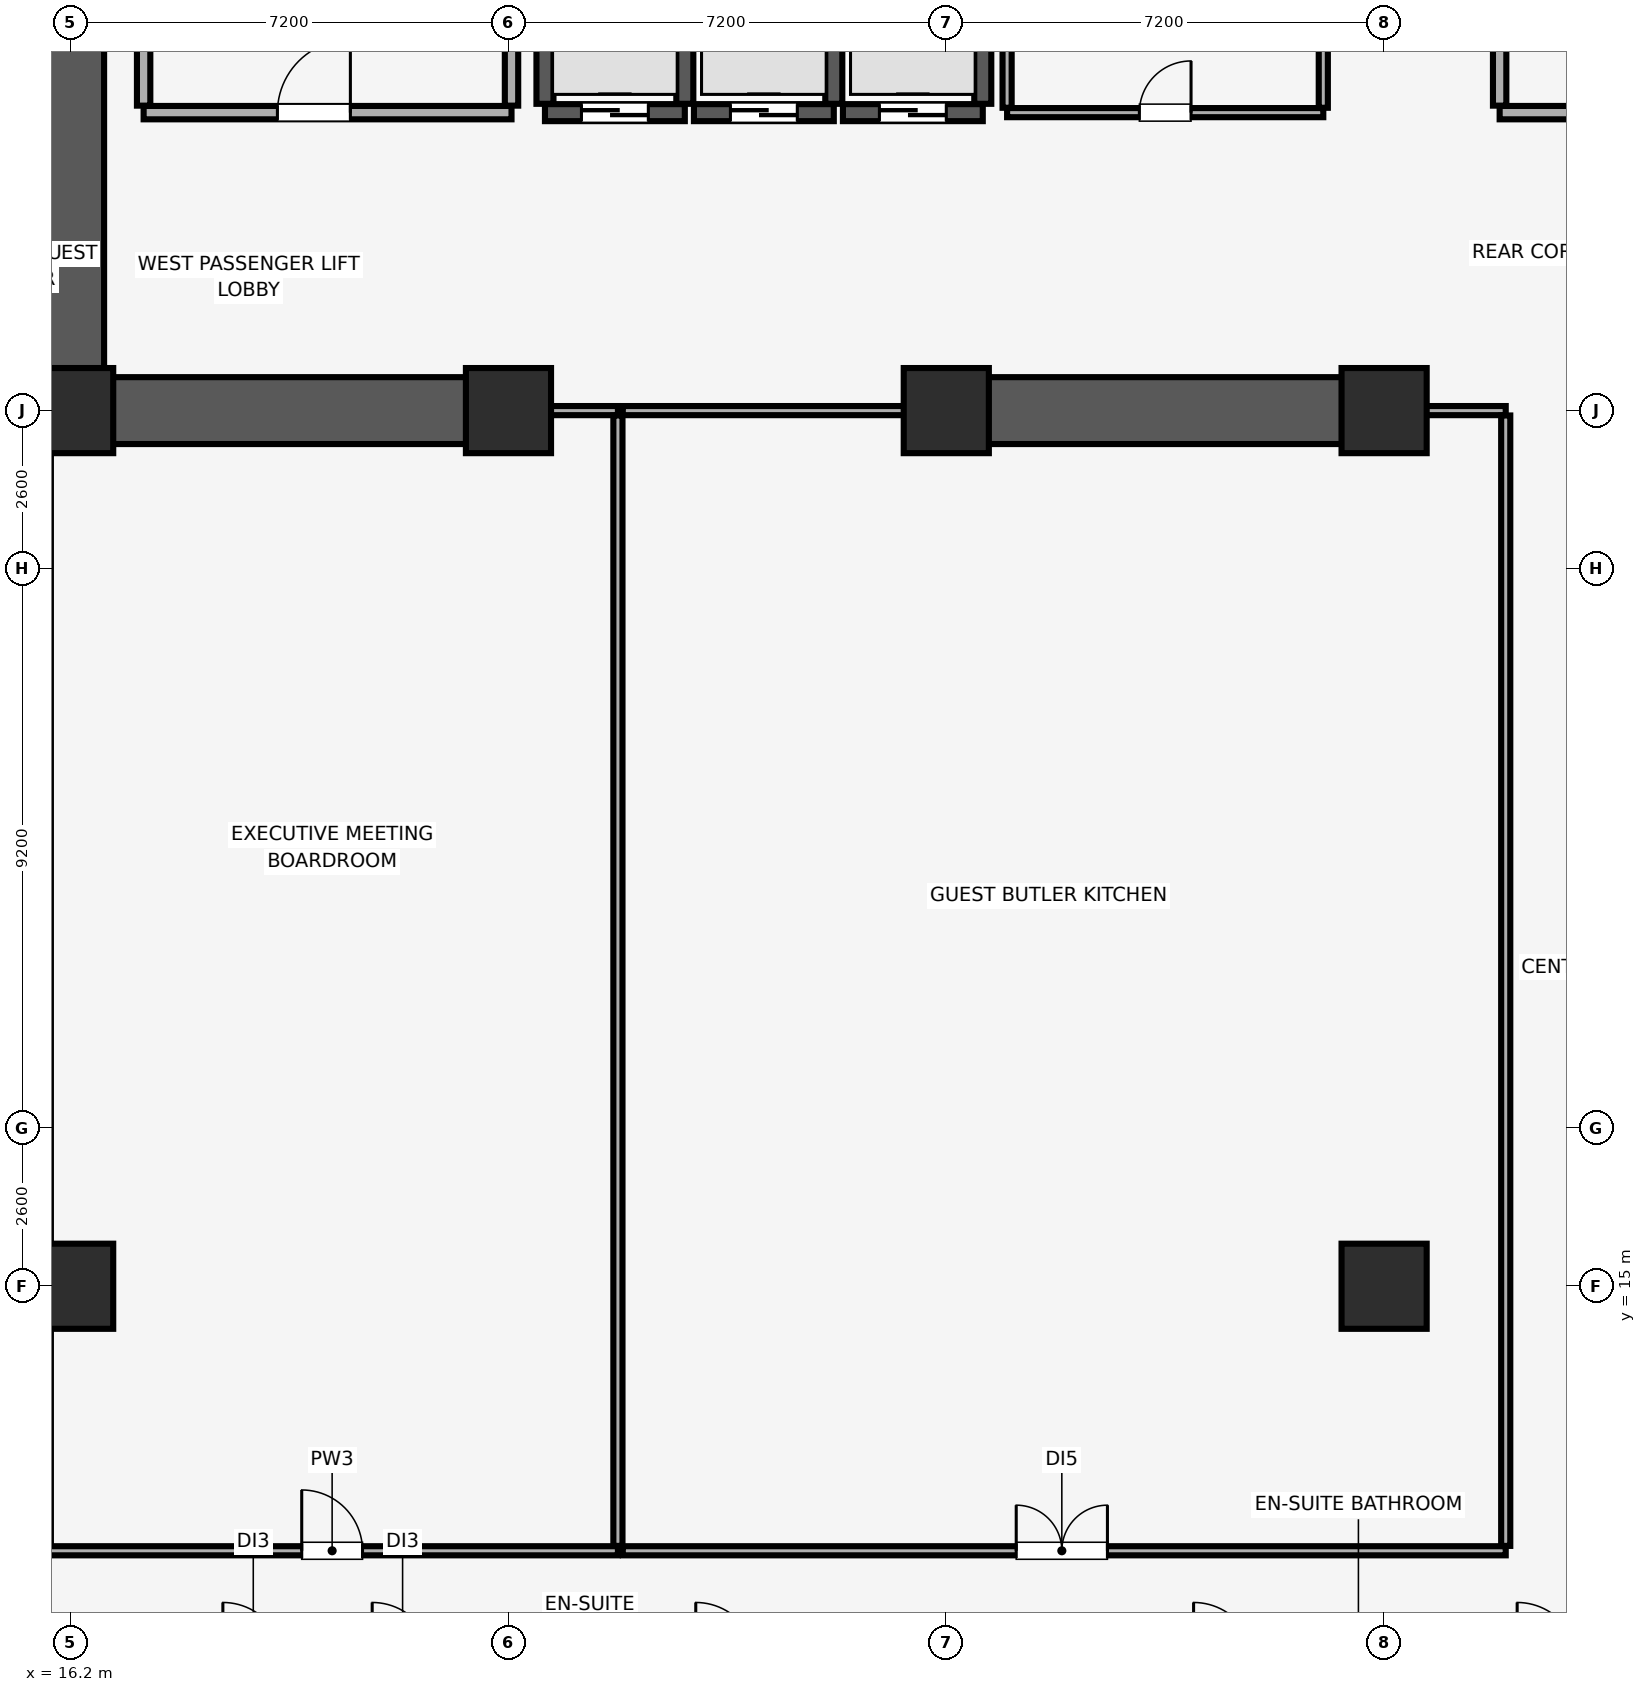
"""IFC4 building model, lengths in metres.
Left out: names, types, materials, properties, quantities, classifications, styles, units other than length and angle.
Written with IfcOpenShell. Run it as: python <this file> out.ifc"""

import sys

from ifc_helpers import new_model, si_unit, direction, frame, frame_2d, origin, origin_2d, place, context, subcontext, project, spatial, rectangle, extrude, element, fill, save


model = new_model("IFC4")
c1 = context("Model", 3, precision=1e-05, world=origin(), true_north=direction((0.0, 1.0)))
c2 = subcontext(c1, "Body", "Model", "MODEL_VIEW")
j1 = project(units=[si_unit("LENGTHUNIT", "METRE"), si_unit("PLANEANGLEUNIT", "RADIAN")], contexts=[c1])
p1 = place(None, origin())
s1 = spatial("IfcSite", under=j1, at=p1, CompositionType="ELEMENT")
p2 = place(p1, origin())
s2 = spatial("IfcBuilding", under=s1, at=p2, CompositionType="ELEMENT")
p3 = place(p2, frame((0.0, 0.0, 31.4)))
s3 = spatial("IfcBuildingStorey", under=s2, at=p3, CompositionType="ELEMENT", Elevation=31.4)
for number, where, z_axis, x_axis in (
    (1, (16.2, 15.0, 0.0), (0.0, 0.0, 1.0), (1.0, 0.0, 0.0)),
    (2, (37.8, 15.0, 0.0), (0.0, 0.0, 1.0), (1.0, 0.0, 0.0)),
    (3, (16.2, 29.4, 0.0), (0.0, 0.0, 1.0), (1.0, 0.0, 0.0)),
    (4, (23.4, 29.4, 0.0), (0.0, 0.0, 1.0), (1.0, 0.0, 0.0)),
    (5, (30.6, 29.4, 0.0), (0.0, 0.0, 1.0), (1.0, 0.0, 0.0)),
    (6, (37.8, 29.4, 0.0), (0.0, 0.0, 1.0), (1.0, 0.0, 0.0)),
):
    element("IfcColumn", number, at=place(p3, frame(where, z_axis=z_axis, x_axis=x_axis)), inside=s3, PredefinedType="COLUMN", context=c2, shape_type="SweptSolid", body=[
        extrude(rectangle(XDim=1.4, YDim=1.4, at=origin_2d()), origin(), (0.0, 0.0, 1.0), 3.51),
    ])
p4 = place(p3, frame((16.2, 29.4, 0.0), z_axis=(0.0, 0.0, 1.0), x_axis=(0.0, 1.0, 0.0)))
e7 = element("IfcWall", 7, at=p4, inside=s3, PredefinedType="SHEAR", context=c2, shape_type="SweptSolid", body=[
    extrude(rectangle(XDim=19.2, YDim=1.1, at=frame_2d((9.6, 0.0))), origin(), (0.0, 0.0, 1.0), 3.51),
])
p5 = place(p3, frame((16.755, 29.4, 0.0), z_axis=(0.0, 0.0, 1.0), x_axis=(1.0, 0.0, 0.0)))
e8 = element("IfcWall", 8, at=p5, inside=s3, PredefinedType="SHEAR", context=c2, shape_type="SweptSolid", body=[
    extrude(rectangle(XDim=6.845, YDim=1.1, at=frame_2d((3.423, 0.0))), origin(), (0.0, 0.0, 1.0), 3.51),
])
p6 = place(p3, frame((30.4, 29.4, 0.0), z_axis=(0.0, 0.0, 1.0), x_axis=(1.0, 0.0, 0.0)))
e9 = element("IfcWall", 9, at=p6, inside=s3, PredefinedType="SHEAR", context=c2, shape_type="SweptSolid", body=[
    extrude(rectangle(XDim=7.6, YDim=1.1, at=frame_2d((3.8, 0.0))), origin(), (0.0, 0.0, 1.0), 3.51),
])
p7 = place(p3, frame((24.0, 34.3, 0.0), z_axis=(0.0, 0.0, 1.0), x_axis=(1.0, 0.0, 0.0)))
e10 = element("IfcWall", 10, at=p7, inside=s3, PredefinedType="SHEAR", context=c2, shape_type="SweptSolid", body=[
    extrude(rectangle(XDim=2.3, YDim=0.28, at=frame_2d((1.15, 0.0))), origin(), (0.0, 0.0, 1.0), 3.51),
])
p8 = place(p7, frame((0.6, 0.0, 0.0)))
e11 = element("IfcOpeningElement", 11, at=p8, cuts=e10, PredefinedType="OPENING", context=c2, shape_type="SweptSolid", body=[
    extrude(rectangle(XDim=1.1, YDim=2.2, at=frame_2d((0.55, 1.1))), frame((0.0, 0.15, 0.0), z_axis=(0.0, -1.0, 0.0), x_axis=(1.0, 0.0, 0.0)), (0.0, 0.0, 1.0), 0.3),
])
for number, where, z_axis, x_axis in (
    (12, (24.0, 34.445, 0.0), (0.0, 0.0, 1.0), (0.0, 1.0, 0.0)),
    (13, (26.3, 34.445, 0.0), (0.0, 0.0, 1.0), (0.0, 1.0, 0.0)),
):
    element("IfcWall", number, at=place(p3, frame(where, z_axis=z_axis, x_axis=x_axis)), inside=s3, PredefinedType="SHEAR", context=c2, shape_type="SweptSolid", body=[
        extrude(rectangle(XDim=2.01, YDim=0.28, at=frame_2d((1.005, 0.0))), origin(), (0.0, 0.0, 1.0), 3.51),
    ])
p9 = place(p3, frame((26.45, 34.3, 0.0), z_axis=(0.0, 0.0, 1.0), x_axis=(1.0, 0.0, 0.0)))
e14 = element("IfcWall", 14, at=p9, inside=s3, PredefinedType="SHEAR", context=c2, shape_type="SweptSolid", body=[
    extrude(rectangle(XDim=2.3, YDim=0.28, at=frame_2d((1.15, 0.0))), origin(), (0.0, 0.0, 1.0), 3.51),
])
p10 = place(p9, frame((0.6, 0.0, 0.0)))
e15 = element("IfcOpeningElement", 15, at=p10, cuts=e14, PredefinedType="OPENING", context=c2, shape_type="SweptSolid", body=[
    extrude(rectangle(XDim=1.1, YDim=2.2, at=frame_2d((0.55, 1.1))), frame((0.0, 0.15, 0.0), z_axis=(0.0, -1.0, 0.0), x_axis=(1.0, 0.0, 0.0)), (0.0, 0.0, 1.0), 0.3),
])
p11 = place(p3, frame((28.75, 34.445, 0.0), z_axis=(0.0, 0.0, 1.0), x_axis=(0.0, 1.0, 0.0)))
e16 = element("IfcWall", 16, at=p11, inside=s3, PredefinedType="SHEAR", context=c2, shape_type="SweptSolid", body=[
    extrude(rectangle(XDim=2.01, YDim=0.28, at=frame_2d((1.005, 0.0))), origin(), (0.0, 0.0, 1.0), 3.51),
])
p12 = place(p3, frame((28.9, 34.3, 0.0), z_axis=(0.0, 0.0, 1.0), x_axis=(1.0, 0.0, 0.0)))
e17 = element("IfcWall", 17, at=p12, inside=s3, PredefinedType="SHEAR", context=c2, shape_type="SweptSolid", body=[
    extrude(rectangle(XDim=2.3, YDim=0.28, at=frame_2d((1.15, 0.0))), origin(), (0.0, 0.0, 1.0), 3.51),
])
p13 = place(p12, frame((0.6, 0.0, 0.0)))
e18 = element("IfcOpeningElement", 18, at=p13, cuts=e17, PredefinedType="OPENING", context=c2, shape_type="SweptSolid", body=[
    extrude(rectangle(XDim=1.1, YDim=2.2, at=frame_2d((0.55, 1.1))), frame((0.0, 0.15, 0.0), z_axis=(0.0, -1.0, 0.0), x_axis=(1.0, 0.0, 0.0)), (0.0, 0.0, 1.0), 0.3),
])
p14 = place(p3, frame((31.2, 34.445, 0.0), z_axis=(0.0, 0.0, 1.0), x_axis=(0.0, 1.0, 0.0)))
e19 = element("IfcWall", 19, at=p14, inside=s3, PredefinedType="SHEAR", context=c2, shape_type="SweptSolid", body=[
    extrude(rectangle(XDim=2.01, YDim=0.28, at=frame_2d((1.005, 0.0))), origin(), (0.0, 0.0, 1.0), 3.51),
])
p15 = place(p3, frame((17.4, 34.3, 0.0), z_axis=(0.0, 0.0, 1.0), x_axis=(1.0, 0.0, 0.0)))
e20 = element("IfcWall", 20, at=p15, inside=s3, PredefinedType="PARTITIONING", context=c2, shape_type="SweptSolid", body=[
    extrude(rectangle(XDim=6.05, YDim=0.22, at=frame_2d((3.025, 0.0))), origin(), (0.0, 0.0, 1.0), 3.51),
])
p16 = place(p15, frame((2.2, 0.0, 0.0)))
e21 = element("IfcOpeningElement", 21, at=p16, cuts=e20, PredefinedType="OPENING", context=c2, shape_type="SweptSolid", body=[
    extrude(rectangle(XDim=1.2, YDim=2.15, at=frame_2d((0.6, 1.075))), frame((0.0, 0.12, 0.0), z_axis=(0.0, -1.0, 0.0), x_axis=(1.0, 0.0, 0.0)), (0.0, 0.0, 1.0), 0.24),
])
p17 = place(p3, frame((17.4, 34.415, 0.0), z_axis=(0.0, 0.0, 1.0), x_axis=(0.0, 1.0, 0.0)))
e22 = element("IfcWall", 22, at=p17, inside=s3, PredefinedType="PARTITIONING", context=c2, shape_type="SweptSolid", body=[
    extrude(rectangle(XDim=5.43, YDim=0.22, at=frame_2d((2.715, 0.0))), origin(), (0.0, 0.0, 1.0), 3.51),
])
p18 = place(p3, frame((23.45, 34.415, 0.0), z_axis=(0.0, 0.0, 1.0), x_axis=(0.0, 1.0, 0.0)))
e23 = element("IfcWall", 23, at=p18, inside=s3, PredefinedType="PARTITIONING", context=c2, shape_type="SweptSolid", body=[
    extrude(rectangle(XDim=5.64, YDim=0.22, at=frame_2d((2.82, 0.0))), origin(), (0.0, 0.0, 1.0), 3.51),
])
p19 = place(p3, frame((39.7, 34.3, 0.0), z_axis=(0.0, 0.0, 1.0), x_axis=(1.0, 0.0, 0.0)))
e24 = element("IfcWall", 24, at=p19, inside=s3, PredefinedType="PARTITIONING", context=c2, shape_type="SweptSolid", body=[
    extrude(rectangle(XDim=4.6, YDim=0.22, at=frame_2d((2.3, 0.0))), origin(), (0.0, 0.0, 1.0), 3.51),
])
p20 = place(p19, frame((1.7, 0.0, 0.0)))
e25 = element("IfcOpeningElement", 25, at=p20, cuts=e24, PredefinedType="OPENING", context=c2, shape_type="SweptSolid", body=[
    extrude(rectangle(XDim=1.2, YDim=2.15, at=frame_2d((0.6, 1.075))), frame((0.0, 0.12, 0.0), z_axis=(0.0, -1.0, 0.0), x_axis=(1.0, 0.0, 0.0)), (0.0, 0.0, 1.0), 0.24),
])
p21 = place(p3, frame((39.7, 34.415, 0.0), z_axis=(0.0, 0.0, 1.0), x_axis=(0.0, 1.0, 0.0)))
e26 = element("IfcWall", 26, at=p21, inside=s3, PredefinedType="PARTITIONING", context=c2, shape_type="SweptSolid", body=[
    extrude(rectangle(XDim=5.785, YDim=0.22, at=frame_2d((2.893, 0.0))), origin(), (0.0, 0.0, 1.0), 3.51),
])
p22 = place(p3, frame((31.6, 34.3, 0.0), z_axis=(0.0, 0.0, 1.0), x_axis=(1.0, 0.0, 0.0)))
e27 = element("IfcWall", 27, at=p22, inside=s3, PredefinedType="PARTITIONING", context=c2, shape_type="SweptSolid", body=[
    extrude(rectangle(XDim=5.2, YDim=0.15, at=frame_2d((2.6, 0.0))), origin(), (0.0, 0.0, 1.0), 3.51),
])
p23 = place(p22, frame((2.175, 0.0, 0.0)))
e28 = element("IfcOpeningElement", 28, at=p23, cuts=e27, PredefinedType="OPENING", context=c2, shape_type="SweptSolid", body=[
    extrude(rectangle(XDim=0.85, YDim=2.1, at=frame_2d((0.425, 1.05))), frame((0.0, 0.085, 0.0), z_axis=(0.0, -1.0, 0.0), x_axis=(1.0, 0.0, 0.0)), (0.0, 0.0, 1.0), 0.17),
])
for number, where, z_axis, x_axis in (
    (29, (31.6, 34.38, 0.0), (0.0, 0.0, 1.0), (0.0, 1.0, 0.0)),
    (30, (36.8, 34.38, 0.0), (0.0, 0.0, 1.0), (0.0, 1.0, 0.0)),
):
    element("IfcWall", number, at=place(p3, frame(where, z_axis=z_axis, x_axis=x_axis)), inside=s3, PredefinedType="PARTITIONING", context=c2, shape_type="SweptSolid", body=[
        extrude(rectangle(XDim=4.94, YDim=0.15, at=frame_2d((2.47, 0.0))), origin(), (0.0, 0.0, 1.0), 3.51),
    ])
p24 = place(p3, frame((15.8, 10.65, 0.0), z_axis=(0.0, 0.0, 1.0), x_axis=(1.0, 0.0, 0.0)))
e31 = element("IfcWall", 31, at=p24, inside=s3, PredefinedType="PARTITIONING", context=c2, shape_type="SweptSolid", body=[
    extrude(rectangle(XDim=9.4, YDim=0.15, at=frame_2d((4.7, 0.0))), origin(), (0.0, 0.0, 1.0), 3.51),
])
p25 = place(p24, frame((4.2, 0.0, 0.0)))
e32 = element("IfcOpeningElement", 32, at=p25, cuts=e31, PredefinedType="OPENING", context=c2, shape_type="SweptSolid", body=[
    extrude(rectangle(XDim=1.0, YDim=2.15, at=frame_2d((0.5, 1.075))), frame((0.0, 0.085, 0.0), z_axis=(0.0, -1.0, 0.0), x_axis=(1.0, 0.0, 0.0)), (0.0, 0.0, 1.0), 0.17),
])
p26 = place(p3, frame((23.61, 29.4, 0.0), z_axis=(0.0, 0.0, 1.0), x_axis=(1.0, 0.0, 0.0)))
e33 = element("IfcWall", 33, at=p26, inside=s3, PredefinedType="PARTITIONING", context=c2, shape_type="SweptSolid", body=[
    extrude(rectangle(XDim=1.59, YDim=0.15, at=frame_2d((0.795, 0.0))), origin(), (0.0, 0.0, 1.0), 2.41),
])
p27 = place(p3, frame((25.2, 10.73, 0.0), z_axis=(0.0, 0.0, 1.0), x_axis=(0.0, 1.0, 0.0)))
e34 = element("IfcWall", 34, at=p27, inside=s3, PredefinedType="PARTITIONING", context=c2, shape_type="SweptSolid", body=[
    extrude(rectangle(XDim=18.59, YDim=0.15, at=frame_2d((9.295, 0.0))), origin(), (0.0, 0.0, 1.0), 3.51),
])
p28 = place(p3, frame((25.28, 10.65, 0.0), z_axis=(0.0, 0.0, 1.0), x_axis=(1.0, 0.0, 0.0)))
e35 = element("IfcWall", 35, at=p28, inside=s3, PredefinedType="PARTITIONING", context=c2, shape_type="SweptSolid", body=[
    extrude(rectangle(XDim=14.52, YDim=0.15, at=frame_2d((7.26, 0.0))), origin(), (0.0, 0.0, 1.0), 3.51),
])
p29 = place(p28, frame((6.47, 0.0, 0.0)))
e36 = element("IfcOpeningElement", 36, at=p29, cuts=e35, PredefinedType="OPENING", context=c2, shape_type="SweptSolid", body=[
    extrude(rectangle(XDim=1.5, YDim=2.25, at=frame_2d((0.75, 1.125))), frame((0.0, 0.085, 0.0), z_axis=(0.0, -1.0, 0.0), x_axis=(1.0, 0.0, 0.0)), (0.0, 0.0, 1.0), 0.17),
])
p30 = place(p3, frame((25.28, 29.4, 0.0), z_axis=(0.0, 0.0, 1.0), x_axis=(1.0, 0.0, 0.0)))
e37 = element("IfcWall", 37, at=p30, inside=s3, PredefinedType="PARTITIONING", context=c2, shape_type="SweptSolid", body=[
    extrude(rectangle(XDim=5.11, YDim=0.15, at=frame_2d((2.555, 0.0))), origin(), (0.0, 0.0, 1.0), 2.41),
])
p31 = place(p3, frame((38.01, 29.4, 0.0), z_axis=(0.0, 0.0, 1.0), x_axis=(1.0, 0.0, 0.0)))
e38 = element("IfcWall", 38, at=p31, inside=s3, PredefinedType="PARTITIONING", context=c2, shape_type="SweptSolid", body=[
    extrude(rectangle(XDim=1.79, YDim=0.15, at=frame_2d((0.895, 0.0))), origin(), (0.0, 0.0, 1.0), 2.41),
])
p32 = place(p3, frame((39.8, 10.73, 0.0), z_axis=(0.0, 0.0, 1.0), x_axis=(0.0, 1.0, 0.0)))
e39 = element("IfcWall", 39, at=p32, inside=s3, PredefinedType="PARTITIONING", context=c2, shape_type="SweptSolid", body=[
    extrude(rectangle(XDim=18.59, YDim=0.15, at=frame_2d((9.295, 0.0))), origin(), (0.0, 0.0, 1.0), 3.51),
])
p33 = place(p8, origin())
e40 = element("IfcDoor", 40, at=p33, inside=s3, OperationType="DOUBLE_DOOR_SLIDING", PredefinedType="DOOR", context=c2, shape_type="SweptSolid", body=[
    extrude(rectangle(XDim=1.1, YDim=2.2, at=frame_2d((0.55, 1.1))), frame((0.0, 0.025, 0.0), z_axis=(0.0, -1.0, 0.0), x_axis=(1.0, 0.0, 0.0)), (0.0, 0.0, 1.0), 0.05),
])
fill(e11, e40)
p34 = place(p10, origin())
e41 = element("IfcDoor", 41, at=p34, inside=s3, OperationType="DOUBLE_DOOR_SLIDING", PredefinedType="DOOR", context=c2, shape_type="SweptSolid", body=[
    extrude(rectangle(XDim=1.1, YDim=2.2, at=frame_2d((0.55, 1.1))), frame((0.0, 0.025, 0.0), z_axis=(0.0, -1.0, 0.0), x_axis=(1.0, 0.0, 0.0)), (0.0, 0.0, 1.0), 0.05),
])
fill(e15, e41)
p35 = place(p13, origin())
e42 = element("IfcDoor", 42, at=p35, inside=s3, OperationType="DOUBLE_DOOR_SLIDING", PredefinedType="DOOR", context=c2, shape_type="SweptSolid", body=[
    extrude(rectangle(XDim=1.1, YDim=2.2, at=frame_2d((0.55, 1.1))), frame((0.0, 0.025, 0.0), z_axis=(0.0, -1.0, 0.0), x_axis=(1.0, 0.0, 0.0)), (0.0, 0.0, 1.0), 0.05),
])
fill(e18, e42)
p36 = place(p16, origin())
e43 = element("IfcDoor", 43, at=p36, inside=s3, OperationType="SINGLE_SWING_RIGHT", PredefinedType="DOOR", context=c2, shape_type="SweptSolid", body=[
    extrude(rectangle(XDim=1.2, YDim=2.15, at=frame_2d((0.6, 1.075))), frame((0.0, 0.025, 0.0), z_axis=(0.0, -1.0, 0.0), x_axis=(1.0, 0.0, 0.0)), (0.0, 0.0, 1.0), 0.05),
])
fill(e21, e43)
p37 = place(p23, origin())
e44 = element("IfcDoor", 44, at=p37, inside=s3, OperationType="SINGLE_SWING_RIGHT", PredefinedType="DOOR", context=c2, shape_type="SweptSolid", body=[
    extrude(rectangle(XDim=0.85, YDim=2.1, at=frame_2d((0.425, 1.05))), frame((0.0, 0.025, 0.0), z_axis=(0.0, -1.0, 0.0), x_axis=(1.0, 0.0, 0.0)), (0.0, 0.0, 1.0), 0.05),
])
fill(e28, e44)
p38 = place(p25, origin())
e45 = element("IfcDoor", 45, at=p38, inside=s3, OperationType="SINGLE_SWING_LEFT", PredefinedType="DOOR", context=c2, shape_type="SweptSolid", body=[
    extrude(rectangle(XDim=1.0, YDim=2.15, at=frame_2d((0.5, 1.075))), frame((0.0, 0.025, 0.0), z_axis=(0.0, -1.0, 0.0), x_axis=(1.0, 0.0, 0.0)), (0.0, 0.0, 1.0), 0.05),
])
fill(e32, e45)
p39 = place(p29, origin())
e46 = element("IfcDoor", 46, at=p39, inside=s3, OperationType="DOUBLE_DOOR_SINGLE_SWING", PredefinedType="DOOR", context=c2, shape_type="SweptSolid", body=[
    extrude(rectangle(XDim=1.5, YDim=2.25, at=frame_2d((0.75, 1.125))), frame((0.0, 0.025, 0.0), z_axis=(0.0, -1.0, 0.0), x_axis=(1.0, 0.0, 0.0)), (0.0, 0.0, 1.0), 0.05),
])
fill(e36, e46)
save(model, sys.argv[1])
